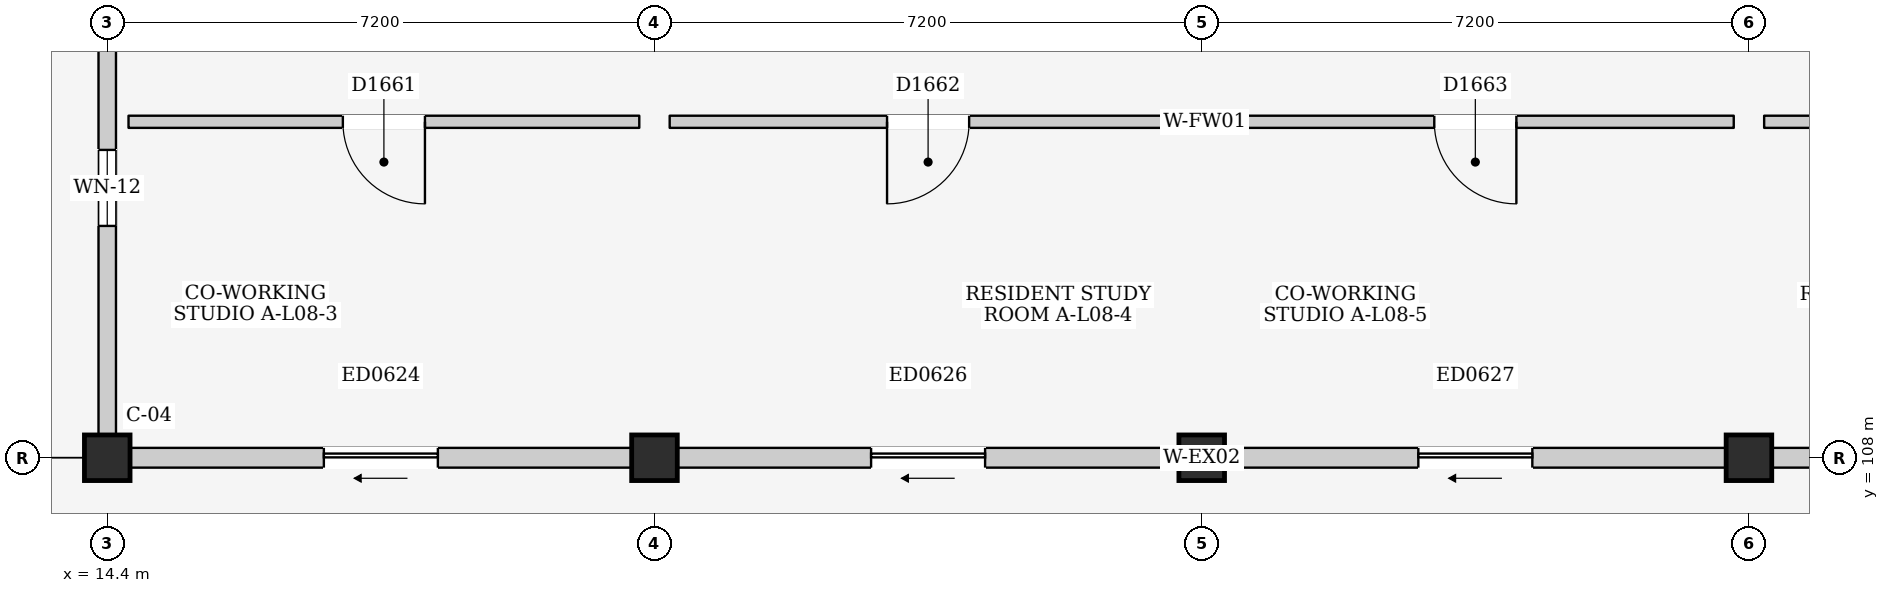
"""IFC4 building model, lengths in metres.
Left out: names, types, materials, properties, quantities, classifications, styles, units other than length and angle.
Written with IfcOpenShell. Run it as: python <this file> out.ifc"""

import sys

from ifc_helpers import new_model, si_unit, direction, frame, frame_2d, origin, origin_2d, place, context, subcontext, project, spatial, rectangle, extrude, element, fill, save


model = new_model("IFC4")
c1 = context("Model", 3, precision=1e-05, world=origin(), true_north=direction((0.0, 1.0)))
c2 = subcontext(c1, "Body", "Model", "MODEL_VIEW")
j1 = project(units=[si_unit("LENGTHUNIT", "METRE"), si_unit("PLANEANGLEUNIT", "RADIAN")], contexts=[c1])
p1 = place(None, origin())
s1 = spatial("IfcSite", under=j1, at=p1, CompositionType="ELEMENT")
p2 = place(p1, origin())
s2 = spatial("IfcBuilding", under=s1, at=p2, CompositionType="ELEMENT")
p3 = place(p2, frame((0.0, 0.0, 28.3)))
s3 = spatial("IfcBuildingStorey", under=s2, at=p3, CompositionType="ELEMENT", Elevation=28.3)
for number, where, z_axis, x_axis in (
    (1, (14.4, 108.0, 0.0), (0.0, 0.0, 1.0), (1.0, 0.0, 0.0)),
    (2, (21.6, 108.0, 0.0), (0.0, 0.0, 1.0), (1.0, 0.0, 0.0)),
    (3, (28.8, 108.0, 0.0), (0.0, 0.0, 1.0), (1.0, 0.0, 0.0)),
    (4, (36.0, 108.0, 0.0), (0.0, 0.0, 1.0), (1.0, 0.0, 0.0)),
):
    element("IfcColumn", number, at=place(p3, frame(where, z_axis=z_axis, x_axis=x_axis)), inside=s3, PredefinedType="COLUMN", context=c2, shape_type="SweptSolid", body=[
        extrude(rectangle(XDim=0.6, YDim=0.6, at=origin_2d()), origin(), (0.0, 0.0, 1.0), 3.2),
    ])
p4 = place(p3, frame((14.7, 108.0, 0.0), z_axis=(0.0, 0.0, 1.0), x_axis=(1.0, 0.0, 0.0)))
e5 = element("IfcWall", 5, at=p4, inside=s3, PredefinedType="ELEMENTEDWALL", context=c2, shape_type="SweptSolid", body=[
    extrude(rectangle(XDim=6.6, YDim=0.26, at=frame_2d((3.3, 0.0))), origin(), (0.0, 0.0, 1.0), 2.285),
])
p5 = place(p4, frame((2.55, 0.0, 0.0)))
e6 = element("IfcOpeningElement", 6, at=p5, cuts=e5, PredefinedType="OPENING", context=c2, shape_type="SweptSolid", body=[
    extrude(rectangle(XDim=1.5, YDim=2.12, at=frame_2d((0.75, 1.06))), frame((0.0, 0.145, 0.0), z_axis=(0.0, -1.0, 0.0), x_axis=(1.0, 0.0, 0.0)), (0.0, 0.0, 1.0), 0.29),
])
p6 = place(p3, frame((21.9, 108.0, 0.0), z_axis=(0.0, 0.0, 1.0), x_axis=(1.0, 0.0, 0.0)))
e7 = element("IfcWall", 7, at=p6, inside=s3, PredefinedType="ELEMENTEDWALL", context=c2, shape_type="SweptSolid", body=[
    extrude(rectangle(XDim=6.6, YDim=0.26, at=frame_2d((3.3, 0.0))), origin(), (0.0, 0.0, 1.0), 2.285),
])
p7 = place(p6, frame((2.55, 0.0, 0.0)))
e8 = element("IfcOpeningElement", 8, at=p7, cuts=e7, PredefinedType="OPENING", context=c2, shape_type="SweptSolid", body=[
    extrude(rectangle(XDim=1.5, YDim=2.12, at=frame_2d((0.75, 1.06))), frame((0.0, 0.145, 0.0), z_axis=(0.0, -1.0, 0.0), x_axis=(1.0, 0.0, 0.0)), (0.0, 0.0, 1.0), 0.29),
])
p8 = place(p3, frame((29.1, 108.0, 0.0), z_axis=(0.0, 0.0, 1.0), x_axis=(1.0, 0.0, 0.0)))
e9 = element("IfcWall", 9, at=p8, inside=s3, PredefinedType="ELEMENTEDWALL", context=c2, shape_type="SweptSolid", body=[
    extrude(rectangle(XDim=6.6, YDim=0.26, at=frame_2d((3.3, 0.0))), origin(), (0.0, 0.0, 1.0), 2.285),
])
p9 = place(p8, frame((2.55, 0.0, 0.0)))
e10 = element("IfcOpeningElement", 10, at=p9, cuts=e9, PredefinedType="OPENING", context=c2, shape_type="SweptSolid", body=[
    extrude(rectangle(XDim=1.5, YDim=2.12, at=frame_2d((0.75, 1.06))), frame((0.0, 0.145, 0.0), z_axis=(0.0, -1.0, 0.0), x_axis=(1.0, 0.0, 0.0)), (0.0, 0.0, 1.0), 0.29),
])
p10 = place(p3, frame((36.3, 108.0, 0.0), z_axis=(0.0, 0.0, 1.0), x_axis=(1.0, 0.0, 0.0)))
e11 = element("IfcWall", 11, at=p10, inside=s3, PredefinedType="ELEMENTEDWALL", context=c2, shape_type="SweptSolid", body=[
    extrude(rectangle(XDim=6.6, YDim=0.26, at=frame_2d((3.3, 0.0))), origin(), (0.0, 0.0, 1.0), 2.285),
])
p11 = place(p10, frame((2.55, 0.0, 0.0)))
e12 = element("IfcOpeningElement", 12, at=p11, cuts=e11, PredefinedType="OPENING", context=c2, shape_type="SweptSolid", body=[
    extrude(rectangle(XDim=1.5, YDim=2.12, at=frame_2d((0.75, 1.06))), frame((0.0, 0.145, 0.0), z_axis=(0.0, -1.0, 0.0), x_axis=(1.0, 0.0, 0.0)), (0.0, 0.0, 1.0), 0.29),
])
p12 = place(p3, frame((14.4, 108.3, 0.0), z_axis=(0.0, 0.0, 1.0), x_axis=(0.0, 1.0, 0.0)))
e13 = element("IfcWall", 13, at=p12, inside=s3, PredefinedType="ELEMENTEDWALL", context=c2, shape_type="SweptSolid", body=[
    extrude(rectangle(XDim=6.6, YDim=0.23, at=frame_2d((3.3, 0.0))), origin(), (0.0, 0.0, 1.0), 2.435),
])
p13 = place(p12, frame((2.75, 0.0, 1.1)))
e14 = element("IfcOpeningElement", 14, at=p13, cuts=e13, PredefinedType="OPENING", context=c2, shape_type="SweptSolid", body=[
    extrude(rectangle(XDim=1.0, YDim=0.9, at=frame_2d((0.5, 0.45))), frame((0.0, 0.13, 0.0), z_axis=(0.0, -1.0, 0.0), x_axis=(1.0, 0.0, 0.0)), (0.0, 0.0, 1.0), 0.26),
])
p14 = place(p3, frame((14.68, 112.42, 0.0), z_axis=(0.0, 0.0, 1.0), x_axis=(1.0, 0.0, 0.0)))
e15 = element("IfcWall", 15, at=p14, inside=s3, PredefinedType="PARTITIONING", context=c2, shape_type="SweptSolid", body=[
    extrude(rectangle(XDim=6.72, YDim=0.16, at=frame_2d((3.36, 0.0))), origin(), (0.0, 0.0, 1.0), 2.95),
])
p15 = place(p14, frame((2.82, 0.0, 0.0)))
e16 = element("IfcOpeningElement", 16, at=p15, cuts=e15, PredefinedType="OPENING", context=c2, shape_type="SweptSolid", body=[
    extrude(rectangle(XDim=1.08, YDim=2.22, at=frame_2d((0.54, 1.11))), frame((0.0, 0.095, 0.0), z_axis=(0.0, -1.0, 0.0), x_axis=(1.0, 0.0, 0.0)), (0.0, 0.0, 1.0), 0.19),
])
p16 = place(p3, frame((21.8, 112.42, 0.0), z_axis=(0.0, 0.0, 1.0), x_axis=(1.0, 0.0, 0.0)))
e17 = element("IfcWall", 17, at=p16, inside=s3, PredefinedType="PARTITIONING", context=c2, shape_type="SweptSolid", body=[
    extrude(rectangle(XDim=6.8, YDim=0.16, at=frame_2d((3.4, 0.0))), origin(), (0.0, 0.0, 1.0), 2.95),
])
p17 = place(p16, frame((2.86, 0.0, 0.0)))
e18 = element("IfcOpeningElement", 18, at=p17, cuts=e17, PredefinedType="OPENING", context=c2, shape_type="SweptSolid", body=[
    extrude(rectangle(XDim=1.08, YDim=2.22, at=frame_2d((0.54, 1.11))), frame((0.0, 0.095, 0.0), z_axis=(0.0, -1.0, 0.0), x_axis=(1.0, 0.0, 0.0)), (0.0, 0.0, 1.0), 0.19),
])
p18 = place(p3, frame((29.0, 112.42, 0.0), z_axis=(0.0, 0.0, 1.0), x_axis=(1.0, 0.0, 0.0)))
e19 = element("IfcWall", 19, at=p18, inside=s3, PredefinedType="PARTITIONING", context=c2, shape_type="SweptSolid", body=[
    extrude(rectangle(XDim=6.8, YDim=0.16, at=frame_2d((3.4, 0.0))), origin(), (0.0, 0.0, 1.0), 2.95),
])
p19 = place(p18, frame((2.86, 0.0, 0.0)))
e20 = element("IfcOpeningElement", 20, at=p19, cuts=e19, PredefinedType="OPENING", context=c2, shape_type="SweptSolid", body=[
    extrude(rectangle(XDim=1.08, YDim=2.22, at=frame_2d((0.54, 1.11))), frame((0.0, 0.095, 0.0), z_axis=(0.0, -1.0, 0.0), x_axis=(1.0, 0.0, 0.0)), (0.0, 0.0, 1.0), 0.19),
])
p20 = place(p3, frame((36.2, 112.42, 0.0), z_axis=(0.0, 0.0, 1.0), x_axis=(1.0, 0.0, 0.0)))
e21 = element("IfcWall", 21, at=p20, inside=s3, PredefinedType="PARTITIONING", context=c2, shape_type="SweptSolid", body=[
    extrude(rectangle(XDim=6.8, YDim=0.16, at=frame_2d((3.4, 0.0))), origin(), (0.0, 0.0, 1.0), 2.95),
])
p21 = place(p20, frame((2.86, 0.0, 0.0)))
e22 = element("IfcOpeningElement", 22, at=p21, cuts=e21, PredefinedType="OPENING", context=c2, shape_type="SweptSolid", body=[
    extrude(rectangle(XDim=1.08, YDim=2.22, at=frame_2d((0.54, 1.11))), frame((0.0, 0.095, 0.0), z_axis=(0.0, -1.0, 0.0), x_axis=(1.0, 0.0, 0.0)), (0.0, 0.0, 1.0), 0.19),
])
p22 = place(p5, frame((1.5, 0.0, 0.0), z_axis=(0.0, 0.0, 1.0), x_axis=(-1.0, 0.0, 0.0)))
e23 = element("IfcDoor", 23, at=p22, inside=s3, OperationType="SLIDING_TO_LEFT", PredefinedType="DOOR", context=c2, shape_type="SweptSolid", body=[
    extrude(rectangle(XDim=1.5, YDim=2.12, at=frame_2d((0.75, 1.06))), frame((0.0, 0.025, 0.0), z_axis=(0.0, -1.0, 0.0), x_axis=(1.0, 0.0, 0.0)), (0.0, 0.0, 1.0), 0.05),
])
fill(e6, e23)
p23 = place(p7, frame((1.5, 0.0, 0.0), z_axis=(0.0, 0.0, 1.0), x_axis=(-1.0, 0.0, 0.0)))
e24 = element("IfcDoor", 24, at=p23, inside=s3, OperationType="SLIDING_TO_LEFT", PredefinedType="DOOR", context=c2, shape_type="SweptSolid", body=[
    extrude(rectangle(XDim=1.5, YDim=2.12, at=frame_2d((0.75, 1.06))), frame((0.0, 0.025, 0.0), z_axis=(0.0, -1.0, 0.0), x_axis=(1.0, 0.0, 0.0)), (0.0, 0.0, 1.0), 0.05),
])
fill(e8, e24)
p24 = place(p9, frame((1.5, 0.0, 0.0), z_axis=(0.0, 0.0, 1.0), x_axis=(-1.0, 0.0, 0.0)))
e25 = element("IfcDoor", 25, at=p24, inside=s3, OperationType="SLIDING_TO_LEFT", PredefinedType="DOOR", context=c2, shape_type="SweptSolid", body=[
    extrude(rectangle(XDim=1.5, YDim=2.12, at=frame_2d((0.75, 1.06))), frame((0.0, 0.025, 0.0), z_axis=(0.0, -1.0, 0.0), x_axis=(1.0, 0.0, 0.0)), (0.0, 0.0, 1.0), 0.05),
])
fill(e10, e25)
p25 = place(p13, origin())
e26 = element("IfcWindow", 26, at=p25, inside=s3, PartitioningType="SINGLE_PANEL", PredefinedType="WINDOW", context=c2, shape_type="SweptSolid", body=[
    extrude(rectangle(XDim=1.0, YDim=0.9, at=frame_2d((0.5, 0.45))), frame((0.0, 0.03, 0.0), z_axis=(0.0, -1.0, 0.0), x_axis=(1.0, 0.0, 0.0)), (0.0, 0.0, 1.0), 0.06),
])
fill(e14, e26)
p26 = place(p15, frame((1.08, 0.0, 0.0), z_axis=(0.0, 0.0, 1.0), x_axis=(-1.0, 0.0, 0.0)))
e27 = element("IfcDoor", 27, at=p26, inside=s3, OperationType="SINGLE_SWING_LEFT", PredefinedType="DOOR", context=c2, shape_type="SweptSolid", body=[
    extrude(rectangle(XDim=1.08, YDim=2.22, at=frame_2d((0.54, 1.11))), frame((0.0, 0.025, 0.0), z_axis=(0.0, -1.0, 0.0), x_axis=(1.0, 0.0, 0.0)), (0.0, 0.0, 1.0), 0.05),
])
fill(e16, e27)
p27 = place(p17, frame((1.08, 0.0, 0.0), z_axis=(0.0, 0.0, 1.0), x_axis=(-1.0, 0.0, 0.0)))
e28 = element("IfcDoor", 28, at=p27, inside=s3, OperationType="SINGLE_SWING_RIGHT", PredefinedType="DOOR", context=c2, shape_type="SweptSolid", body=[
    extrude(rectangle(XDim=1.08, YDim=2.22, at=frame_2d((0.54, 1.11))), frame((0.0, 0.025, 0.0), z_axis=(0.0, -1.0, 0.0), x_axis=(1.0, 0.0, 0.0)), (0.0, 0.0, 1.0), 0.05),
])
fill(e18, e28)
p28 = place(p19, frame((1.08, 0.0, 0.0), z_axis=(0.0, 0.0, 1.0), x_axis=(-1.0, 0.0, 0.0)))
e29 = element("IfcDoor", 29, at=p28, inside=s3, OperationType="SINGLE_SWING_LEFT", PredefinedType="DOOR", context=c2, shape_type="SweptSolid", body=[
    extrude(rectangle(XDim=1.08, YDim=2.22, at=frame_2d((0.54, 1.11))), frame((0.0, 0.025, 0.0), z_axis=(0.0, -1.0, 0.0), x_axis=(1.0, 0.0, 0.0)), (0.0, 0.0, 1.0), 0.05),
])
fill(e20, e29)
save(model, sys.argv[1])
